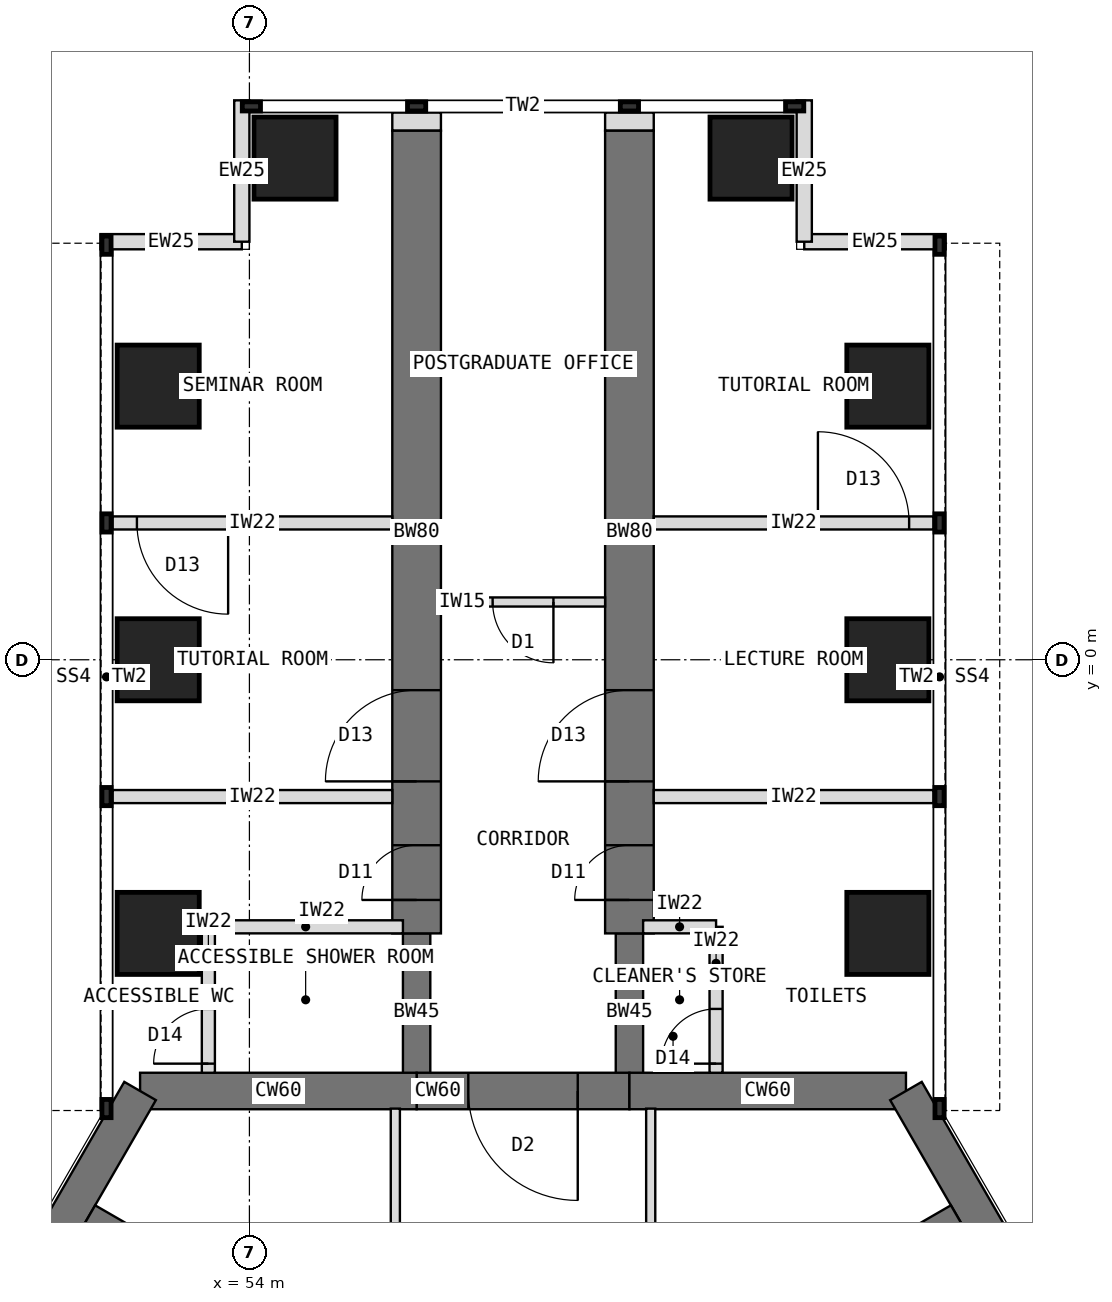
"""IFC4 building model, lengths in metres.
Left out: names, types, materials, properties, quantities, classifications, styles, units other than length and angle.
Written with IfcOpenShell. Run it as: python <this file> out.ifc"""

import sys

from ifc_helpers import new_model, si_unit, direction, frame, frame_2d, origin, origin_2d, place, context, subcontext, project, spatial, rectangle, extrude, element, fill, save


model = new_model("IFC4")
c1 = context("Model", 3, precision=1e-05, world=origin(), true_north=direction((0.0, 1.0)))
c2 = subcontext(c1, "Body", "Model", "MODEL_VIEW")
j1 = project(units=[si_unit("LENGTHUNIT", "METRE"), si_unit("PLANEANGLEUNIT", "RADIAN")], contexts=[c1])
p1 = place(None, origin())
s1 = spatial("IfcSite", under=j1, at=p1, CompositionType="ELEMENT")
p2 = place(p1, origin())
s2 = spatial("IfcBuilding", under=s1, at=p2, CompositionType="ELEMENT")
p3 = place(p2, frame((0.0, 0.0, 113.5)))
s3 = spatial("IfcBuildingStorey", under=s2, at=p3, CompositionType="ELEMENT", Elevation=113.5)
p4 = place(p3, frame((64.798, -7.092, 0.0), z_axis=(0.0, 0.0, 1.0), x_axis=(-1.0, 0.0, 0.0)))
e1 = element("IfcWall", 1, at=p4, inside=s3, PredefinedType="SHEAR", context=c2, shape_type="SweptSolid", body=[
    extrude(rectangle(XDim=4.548, YDim=0.6, at=frame_2d((2.274, 0.0))), origin(), (0.0, 0.0, 1.0), 4.0),
])
p5 = place(p3, frame((60.25, -7.092, 0.0), z_axis=(0.0, 0.0, 1.0), x_axis=(-1.0, 0.0, 0.0)))
e2 = element("IfcWall", 2, at=p5, inside=s3, PredefinedType="SHEAR", context=c2, shape_type="SweptSolid", body=[
    extrude(rectangle(XDim=3.5, YDim=0.6, at=frame_2d((1.75, 0.0))), origin(), (0.0, 0.0, 1.0), 4.0),
])
p6 = place(p5, frame((0.85, 0.0, 0.0)))
e3 = element("IfcOpeningElement", 3, at=p6, cuts=e2, PredefinedType="OPENING", context=c2, shape_type="SweptSolid", body=[
    extrude(rectangle(XDim=1.8, YDim=2.1, at=frame_2d((0.9, 1.05))), frame((0.0, 0.31, 0.0), z_axis=(0.0, -1.0, 0.0), x_axis=(1.0, 0.0, 0.0)), (0.0, 0.0, 1.0), 0.62),
])
p7 = place(p3, frame((56.75, -7.092, 0.0), z_axis=(0.0, 0.0, 1.0), x_axis=(-1.0, 0.0, 0.0)))
e4 = element("IfcWall", 4, at=p7, inside=s3, PredefinedType="SHEAR", context=c2, shape_type="SweptSolid", body=[
    extrude(rectangle(XDim=4.548, YDim=0.6, at=frame_2d((2.274, 0.0))), origin(), (0.0, 0.0, 1.0), 4.0),
])
for number, where, z_axis, x_axis in (
    (5, (52.202, -7.092, 0.0), (0.0, 0.0, 1.0), (-0.5, -0.866, 0.0)),
    (6, (71.096, -18.0, 0.0), (0.0, 0.0, 1.0), (-0.5, 0.866, 0.0)),
):
    element("IfcWall", number, at=place(p3, frame(where, z_axis=z_axis, x_axis=x_axis)), inside=s3, PredefinedType="SHEAR", context=c2, shape_type="SweptSolid", body=[
        extrude(rectangle(XDim=12.596, YDim=0.6, at=frame_2d((6.298, 0.0))), origin(), (0.0, 0.0, 1.0), 4.0),
    ])
p8 = place(p3, frame((56.75, -7.092, 0.0), z_axis=(0.0, 0.0, 1.0), x_axis=(0.0, 1.0, 0.0)))
e7 = element("IfcWall", 7, at=p8, inside=s3, PredefinedType="SHEAR", context=c2, shape_type="SweptSolid", body=[
    extrude(rectangle(XDim=2.592, YDim=0.45, at=frame_2d((1.296, 0.0))), origin(), (0.0, 0.0, 1.0), 4.0),
])
p9 = place(p3, frame((56.75, -4.5, 0.0), z_axis=(0.0, 0.0, 1.0), x_axis=(0.0, 1.0, 0.0)))
e8 = element("IfcWall", 8, at=p9, inside=s3, PredefinedType="SHEAR", context=c2, shape_type="SweptSolid", body=[
    extrude(rectangle(XDim=13.2, YDim=0.8, at=frame_2d((6.6, 0.0))), origin(), (0.0, 0.0, 1.0), 4.0),
])
p10 = place(p9, frame((0.55, 0.0, 0.0)))
e9 = element("IfcOpeningElement", 9, at=p10, cuts=e8, PredefinedType="OPENING", context=c2, shape_type="SweptSolid", body=[
    extrude(rectangle(XDim=0.9, YDim=2.1, at=frame_2d((0.45, 1.05))), frame((0.0, 0.41, 0.0), z_axis=(0.0, -1.0, 0.0), x_axis=(1.0, 0.0, 0.0)), (0.0, 0.0, 1.0), 0.82),
])
p11 = place(p9, frame((2.5, 0.0, 0.0)))
e10 = element("IfcOpeningElement", 10, at=p11, cuts=e8, PredefinedType="OPENING", context=c2, shape_type="SweptSolid", body=[
    extrude(rectangle(XDim=1.5, YDim=2.1, at=frame_2d((0.75, 1.05))), frame((0.0, 0.41, 0.0), z_axis=(0.0, -1.0, 0.0), x_axis=(1.0, 0.0, 0.0)), (0.0, 0.0, 1.0), 0.82),
])
p12 = place(p3, frame((60.25, -7.092, 0.0), z_axis=(0.0, 0.0, 1.0), x_axis=(0.0, 1.0, 0.0)))
e11 = element("IfcWall", 11, at=p12, inside=s3, PredefinedType="SHEAR", context=c2, shape_type="SweptSolid", body=[
    extrude(rectangle(XDim=2.592, YDim=0.45, at=frame_2d((1.296, 0.0))), origin(), (0.0, 0.0, 1.0), 4.0),
])
p13 = place(p3, frame((60.25, -4.5, 0.0), z_axis=(0.0, 0.0, 1.0), x_axis=(0.0, 1.0, 0.0)))
e12 = element("IfcWall", 12, at=p13, inside=s3, PredefinedType="SHEAR", context=c2, shape_type="SweptSolid", body=[
    extrude(rectangle(XDim=13.2, YDim=0.8, at=frame_2d((6.6, 0.0))), origin(), (0.0, 0.0, 1.0), 4.0),
])
p14 = place(p13, frame((0.55, 0.0, 0.0)))
e13 = element("IfcOpeningElement", 13, at=p14, cuts=e12, PredefinedType="OPENING", context=c2, shape_type="SweptSolid", body=[
    extrude(rectangle(XDim=0.9, YDim=2.1, at=frame_2d((0.45, 1.05))), frame((0.0, 0.41, 0.0), z_axis=(0.0, -1.0, 0.0), x_axis=(1.0, 0.0, 0.0)), (0.0, 0.0, 1.0), 0.82),
])
p15 = place(p13, frame((2.5, 0.0, 0.0)))
e14 = element("IfcOpeningElement", 14, at=p15, cuts=e12, PredefinedType="OPENING", context=c2, shape_type="SweptSolid", body=[
    extrude(rectangle(XDim=1.5, YDim=2.1, at=frame_2d((0.75, 1.05))), frame((0.0, 0.41, 0.0), z_axis=(0.0, -1.0, 0.0), x_axis=(1.0, 0.0, 0.0)), (0.0, 0.0, 1.0), 0.82),
])
for number, where, z_axis, x_axis in (
    (15, (52.5, -4.5, 0.0), (0.0, 0.0, 1.0), (1.0, 0.0, 0.0)),
    (16, (64.5, -4.5, 0.0), (0.0, 0.0, 1.0), (1.0, 0.0, 0.0)),
    (17, (52.5, 0.0, 0.0), (0.0, 0.0, 1.0), (1.0, 0.0, 0.0)),
    (18, (64.5, 0.0, 0.0), (0.0, 0.0, 1.0), (1.0, 0.0, 0.0)),
    (19, (52.5, 4.5, 0.0), (0.0, 0.0, 1.0), (1.0, 0.0, 0.0)),
    (20, (64.5, 4.5, 0.0), (0.0, 0.0, 1.0), (1.0, 0.0, 0.0)),
    (21, (54.75, 8.25, 0.0), (0.0, 0.0, 1.0), (1.0, 0.0, 0.0)),
    (22, (62.25, 8.25, 0.0), (0.0, 0.0, 1.0), (1.0, 0.0, 0.0)),
):
    element("IfcColumn", number, at=place(p3, frame(where, z_axis=z_axis, x_axis=x_axis)), inside=s3, PredefinedType="COLUMN", context=c2, shape_type="SweptSolid", body=[
        extrude(rectangle(XDim=1.35, YDim=1.35, at=origin_2d()), origin(), (0.0, 0.0, 1.0), 4.0),
    ])
for number, where, z_axis, x_axis in (
    (23, (51.55, 6.875, 0.0), (0.0, 0.0, 1.0), (1.0, 0.0, 0.0)),
    (24, (53.875, 6.875, 0.0), (0.0, 0.0, 1.0), (0.0, 1.0, 0.0)),
    (25, (65.45, 6.875, 0.0), (0.0, 0.0, 1.0), (-1.0, 0.0, 0.0)),
    (26, (63.125, 6.875, 0.0), (0.0, 0.0, 1.0), (0.0, 1.0, 0.0)),
):
    element("IfcWall", number, at=place(p3, frame(where, z_axis=z_axis, x_axis=x_axis)), inside=s3, PredefinedType="STANDARD", context=c2, shape_type="SweptSolid", body=[
        extrude(rectangle(XDim=2.325, YDim=0.25, at=frame_2d((1.163, 0.0))), origin(), (0.0, 0.0, 1.0), 3.8),
    ])
for number, where, z_axis, x_axis in (
    (27, (56.75, 8.7, 0.0), (0.0, 0.0, 1.0), (0.0, 1.0, 0.0)),
    (28, (60.25, 8.7, 0.0), (0.0, 0.0, 1.0), (0.0, 1.0, 0.0)),
):
    element("IfcWall", number, at=place(p3, frame(where, z_axis=z_axis, x_axis=x_axis)), inside=s3, PredefinedType="PARTITIONING", context=c2, shape_type="SweptSolid", body=[
        extrude(rectangle(XDim=0.3, YDim=0.8, at=frame_2d((0.15, 0.0))), origin(), (0.0, 0.0, 1.0), 3.8),
    ])
for number, where, z_axis, x_axis in (
    (29, (56.48, -12.099, 0.0), (0.0, 0.0, 1.0), (-0.866, 0.5, 0.0)),
    (30, (60.52, -12.099, 0.0), (0.0, 0.0, 1.0), (0.866, 0.5, 0.0)),
):
    element("IfcWall", number, at=place(p3, frame(where, z_axis=z_axis, x_axis=x_axis)), inside=s3, PredefinedType="SHEAR", context=c2, shape_type="SweptSolid", body=[
        extrude(rectangle(XDim=5.908, YDim=0.4, at=frame_2d((2.954, 0.0))), origin(), (0.0, 0.0, 1.0), 4.0),
    ])
p16 = place(p3, frame((56.35, -2.25, 0.0), z_axis=(0.0, 0.0, 1.0), x_axis=(-1.0, 0.0, 0.0)))
e31 = element("IfcWall", 31, at=p16, inside=s3, PredefinedType="PARTITIONING", context=c2, shape_type="SweptSolid", body=[
    extrude(rectangle(XDim=4.6, YDim=0.215, at=frame_2d((2.3, 0.0))), origin(), (0.0, 0.0, 1.0), 3.8),
])
p17 = place(p3, frame((56.35, 2.25, 0.0), z_axis=(0.0, 0.0, 1.0), x_axis=(-1.0, 0.0, 0.0)))
e32 = element("IfcWall", 32, at=p17, inside=s3, PredefinedType="PARTITIONING", context=c2, shape_type="SweptSolid", body=[
    extrude(rectangle(XDim=4.6, YDim=0.215, at=frame_2d((2.3, 0.0))), origin(), (0.0, 0.0, 1.0), 3.8),
])
p18 = place(p17, frame((2.7, 0.0, 0.0)))
e33 = element("IfcOpeningElement", 33, at=p18, cuts=e32, PredefinedType="OPENING", context=c2, shape_type="SweptSolid", body=[
    extrude(rectangle(XDim=1.5, YDim=2.1, at=frame_2d((0.75, 1.05))), frame((0.0, 0.117, 0.0), z_axis=(0.0, -1.0, 0.0), x_axis=(1.0, 0.0, 0.0)), (0.0, 0.0, 1.0), 0.235),
])
p19 = place(p3, frame((53.325, -6.792, 0.0), z_axis=(0.0, 0.0, 1.0), x_axis=(0.0, 1.0, 0.0)))
e34 = element("IfcWall", 34, at=p19, inside=s3, PredefinedType="PARTITIONING", context=c2, shape_type="SweptSolid", body=[
    extrude(rectangle(XDim=2.4, YDim=0.215, at=frame_2d((1.2, 0.0))), origin(), (0.0, 0.0, 1.0), 3.8),
])
p20 = place(p19, frame((0.15, 0.0, 0.0)))
e35 = element("IfcOpeningElement", 35, at=p20, cuts=e34, PredefinedType="OPENING", context=c2, shape_type="SweptSolid", body=[
    extrude(rectangle(XDim=0.9, YDim=2.1, at=frame_2d((0.45, 1.05))), frame((0.0, 0.117, 0.0), z_axis=(0.0, -1.0, 0.0), x_axis=(1.0, 0.0, 0.0)), (0.0, 0.0, 1.0), 0.235),
])
p21 = place(p3, frame((56.525, -4.392, 0.0), z_axis=(0.0, 0.0, 1.0), x_axis=(-1.0, 0.0, 0.0)))
e36 = element("IfcWall", 36, at=p21, inside=s3, PredefinedType="PARTITIONING", context=c2, shape_type="SweptSolid", body=[
    extrude(rectangle(XDim=3.2, YDim=0.215, at=frame_2d((1.6, 0.0))), origin(), (0.0, 0.0, 1.0), 3.8),
])
p22 = place(p3, frame((60.65, -2.25, 0.0), z_axis=(0.0, 0.0, 1.0), x_axis=(1.0, 0.0, 0.0)))
e37 = element("IfcWall", 37, at=p22, inside=s3, PredefinedType="PARTITIONING", context=c2, shape_type="SweptSolid", body=[
    extrude(rectangle(XDim=4.6, YDim=0.215, at=frame_2d((2.3, 0.0))), origin(), (0.0, 0.0, 1.0), 3.8),
])
p23 = place(p3, frame((60.65, 2.25, 0.0), z_axis=(0.0, 0.0, 1.0), x_axis=(1.0, 0.0, 0.0)))
e38 = element("IfcWall", 38, at=p23, inside=s3, PredefinedType="PARTITIONING", context=c2, shape_type="SweptSolid", body=[
    extrude(rectangle(XDim=4.6, YDim=0.215, at=frame_2d((2.3, 0.0))), origin(), (0.0, 0.0, 1.0), 3.8),
])
p24 = place(p23, frame((2.7, 0.0, 0.0)))
e39 = element("IfcOpeningElement", 39, at=p24, cuts=e38, PredefinedType="OPENING", context=c2, shape_type="SweptSolid", body=[
    extrude(rectangle(XDim=1.5, YDim=2.1, at=frame_2d((0.75, 1.05))), frame((0.0, 0.117, 0.0), z_axis=(0.0, -1.0, 0.0), x_axis=(1.0, 0.0, 0.0)), (0.0, 0.0, 1.0), 0.235),
])
p25 = place(p3, frame((61.675, -6.792, 0.0), z_axis=(0.0, 0.0, 1.0), x_axis=(0.0, 1.0, 0.0)))
e40 = element("IfcWall", 40, at=p25, inside=s3, PredefinedType="PARTITIONING", context=c2, shape_type="SweptSolid", body=[
    extrude(rectangle(XDim=2.4, YDim=0.215, at=frame_2d((1.2, 0.0))), origin(), (0.0, 0.0, 1.0), 3.8),
])
p26 = place(p25, frame((0.15, 0.0, 0.0)))
e41 = element("IfcOpeningElement", 41, at=p26, cuts=e40, PredefinedType="OPENING", context=c2, shape_type="SweptSolid", body=[
    extrude(rectangle(XDim=0.9, YDim=2.1, at=frame_2d((0.45, 1.05))), frame((0.0, 0.117, 0.0), z_axis=(0.0, -1.0, 0.0), x_axis=(1.0, 0.0, 0.0)), (0.0, 0.0, 1.0), 0.235),
])
p27 = place(p3, frame((60.475, -4.392, 0.0), z_axis=(0.0, 0.0, 1.0), x_axis=(1.0, 0.0, 0.0)))
e42 = element("IfcWall", 42, at=p27, inside=s3, PredefinedType="PARTITIONING", context=c2, shape_type="SweptSolid", body=[
    extrude(rectangle(XDim=1.2, YDim=0.215, at=frame_2d((0.6, 0.0))), origin(), (0.0, 0.0, 1.0), 3.8),
])
p28 = place(p3, frame((56.4, -11.857, 0.0), z_axis=(0.0, 0.0, 1.0), x_axis=(0.0, 1.0, 0.0)))
e43 = element("IfcWall", 43, at=p28, inside=s3, PredefinedType="PARTITIONING", context=c2, shape_type="SweptSolid", body=[
    extrude(rectangle(XDim=4.476, YDim=0.15, at=frame_2d((2.238, 0.0))), origin(), (0.0, 0.0, 1.0), 3.8),
])
p29 = place(p28, frame((0.843, 0.0, 0.0)))
e44 = element("IfcOpeningElement", 44, at=p29, cuts=e43, PredefinedType="OPENING", context=c2, shape_type="SweptSolid", body=[
    extrude(rectangle(XDim=1.0, YDim=2.1, at=frame_2d((0.5, 1.05))), frame((0.0, 0.085, 0.0), z_axis=(0.0, -1.0, 0.0), x_axis=(1.0, 0.0, 0.0)), (0.0, 0.0, 1.0), 0.17),
])
p30 = place(p3, frame((60.6, -7.382, 0.0), z_axis=(0.0, 0.0, 1.0), x_axis=(0.0, -1.0, 0.0)))
e45 = element("IfcWall", 45, at=p30, inside=s3, PredefinedType="PARTITIONING", context=c2, shape_type="SweptSolid", body=[
    extrude(rectangle(XDim=4.476, YDim=0.15, at=frame_2d((2.238, 0.0))), origin(), (0.0, 0.0, 1.0), 3.8),
])
p31 = place(p30, frame((2.633, 0.0, 0.0)))
e46 = element("IfcOpeningElement", 46, at=p31, cuts=e45, PredefinedType="OPENING", context=c2, shape_type="SweptSolid", body=[
    extrude(rectangle(XDim=1.0, YDim=2.1, at=frame_2d((0.5, 1.05))), frame((0.0, 0.085, 0.0), z_axis=(0.0, -1.0, 0.0), x_axis=(1.0, 0.0, 0.0)), (0.0, 0.0, 1.0), 0.17),
])
p32 = place(p3, frame((59.85, 0.95, 0.0), z_axis=(0.0, 0.0, 1.0), x_axis=(-1.0, 0.0, 0.0)))
e47 = element("IfcWall", 47, at=p32, inside=s3, PredefinedType="PARTITIONING", context=c2, shape_type="SweptSolid", body=[
    extrude(rectangle(XDim=2.7, YDim=0.15, at=frame_2d((1.35, 0.0))), origin(), (0.0, 0.0, 1.0), 3.8),
])
p33 = place(p32, frame((0.85, 0.0, 0.0)))
e48 = element("IfcOpeningElement", 48, at=p33, cuts=e47, PredefinedType="OPENING", context=c2, shape_type="SweptSolid", body=[
    extrude(rectangle(XDim=1.0, YDim=2.1, at=frame_2d((0.5, 1.05))), frame((0.0, 0.085, 0.0), z_axis=(0.0, -1.0, 0.0), x_axis=(1.0, 0.0, 0.0)), (0.0, 0.0, 1.0), 0.17),
])
p34 = place(p6, origin())
e49 = element("IfcDoor", 49, at=p34, inside=s3, OperationType="DOUBLE_DOOR_DOUBLE_SWING", PredefinedType="DOOR", context=c2, shape_type="SweptSolid", body=[
    extrude(rectangle(XDim=1.72, YDim=2.06, at=frame_2d((0.9, 1.03))), frame((0.0, 0.025, 0.0), z_axis=(0.0, -1.0, 0.0), x_axis=(1.0, 0.0, 0.0)), (0.0, 0.0, 1.0), 0.05),
    extrude(rectangle(XDim=0.04, YDim=2.1, at=frame_2d((0.02, 1.05))), frame((0.0, 0.3, 0.0), z_axis=(0.0, -1.0, 0.0), x_axis=(1.0, 0.0, 0.0)), (0.0, 0.0, 1.0), 0.6),
    extrude(rectangle(XDim=0.04, YDim=2.1, at=frame_2d((1.78, 1.05))), frame((0.0, 0.3, 0.0), z_axis=(0.0, -1.0, 0.0), x_axis=(1.0, 0.0, 0.0)), (0.0, 0.0, 1.0), 0.6),
    extrude(rectangle(XDim=1.72, YDim=0.04, at=frame_2d((0.9, 2.08))), frame((0.0, 0.3, 0.0), z_axis=(0.0, -1.0, 0.0), x_axis=(1.0, 0.0, 0.0)), (0.0, 0.0, 1.0), 0.6),
])
fill(e3, e49)
p35 = place(p18, origin())
e50 = element("IfcDoor", 50, at=p35, inside=s3, OperationType="DOUBLE_DOOR_SINGLE_SWING", PredefinedType="DOOR", context=c2, shape_type="SweptSolid", body=[
    extrude(rectangle(XDim=1.5, YDim=2.1, at=frame_2d((0.75, 1.05))), frame((0.0, 0.025, 0.0), z_axis=(0.0, -1.0, 0.0), x_axis=(1.0, 0.0, 0.0)), (0.0, 0.0, 1.0), 0.05),
])
fill(e33, e50)
p36 = place(p20, origin())
e51 = element("IfcDoor", 51, at=p36, inside=s3, OperationType="SINGLE_SWING_LEFT", PredefinedType="DOOR", context=c2, shape_type="SweptSolid", body=[
    extrude(rectangle(XDim=0.9, YDim=2.1, at=frame_2d((0.45, 1.05))), frame((0.0, 0.025, 0.0), z_axis=(0.0, -1.0, 0.0), x_axis=(1.0, 0.0, 0.0)), (0.0, 0.0, 1.0), 0.05),
])
fill(e35, e51)
p37 = place(p24, origin())
e52 = element("IfcDoor", 52, at=p37, inside=s3, OperationType="DOUBLE_DOOR_SINGLE_SWING", PredefinedType="DOOR", context=c2, shape_type="SweptSolid", body=[
    extrude(rectangle(XDim=1.5, YDim=2.1, at=frame_2d((0.75, 1.05))), frame((0.0, 0.025, 0.0), z_axis=(0.0, -1.0, 0.0), x_axis=(1.0, 0.0, 0.0)), (0.0, 0.0, 1.0), 0.05),
])
fill(e39, e52)
p38 = place(p26, origin())
e53 = element("IfcDoor", 53, at=p38, inside=s3, OperationType="SINGLE_SWING_LEFT", PredefinedType="DOOR", context=c2, shape_type="SweptSolid", body=[
    extrude(rectangle(XDim=0.9, YDim=2.1, at=frame_2d((0.45, 1.05))), frame((0.0, 0.025, 0.0), z_axis=(0.0, -1.0, 0.0), x_axis=(1.0, 0.0, 0.0)), (0.0, 0.0, 1.0), 0.05),
])
fill(e41, e53)
p39 = place(p33, origin())
e54 = element("IfcDoor", 54, at=p39, inside=s3, OperationType="SINGLE_SWING_LEFT", PredefinedType="DOOR", context=c2, shape_type="SweptSolid", body=[
    extrude(rectangle(XDim=1.0, YDim=2.1, at=frame_2d((0.5, 1.05))), frame((0.0, 0.025, 0.0), z_axis=(0.0, -1.0, 0.0), x_axis=(1.0, 0.0, 0.0)), (0.0, 0.0, 1.0), 0.05),
])
fill(e48, e54)
p40 = place(p10, origin())
e55 = element("IfcDoor", 55, at=p40, inside=s3, OperationType="SINGLE_SWING_LEFT", PredefinedType="DOOR", context=c2, shape_type="SweptSolid", body=[
    extrude(rectangle(XDim=0.82, YDim=2.06, at=frame_2d((0.45, 1.03))), frame((0.0, 0.025, 0.0), z_axis=(0.0, -1.0, 0.0), x_axis=(1.0, 0.0, 0.0)), (0.0, 0.0, 1.0), 0.05),
    extrude(rectangle(XDim=0.04, YDim=2.1, at=frame_2d((0.02, 1.05))), frame((0.0, 0.4, 0.0), z_axis=(0.0, -1.0, 0.0), x_axis=(1.0, 0.0, 0.0)), (0.0, 0.0, 1.0), 0.8),
    extrude(rectangle(XDim=0.04, YDim=2.1, at=frame_2d((0.88, 1.05))), frame((0.0, 0.4, 0.0), z_axis=(0.0, -1.0, 0.0), x_axis=(1.0, 0.0, 0.0)), (0.0, 0.0, 1.0), 0.8),
    extrude(rectangle(XDim=0.82, YDim=0.04, at=frame_2d((0.45, 2.08))), frame((0.0, 0.4, 0.0), z_axis=(0.0, -1.0, 0.0), x_axis=(1.0, 0.0, 0.0)), (0.0, 0.0, 1.0), 0.8),
])
fill(e9, e55)
p41 = place(p11, origin())
e56 = element("IfcDoor", 56, at=p41, inside=s3, OperationType="DOUBLE_DOOR_SINGLE_SWING", PredefinedType="DOOR", context=c2, shape_type="SweptSolid", body=[
    extrude(rectangle(XDim=1.42, YDim=2.06, at=frame_2d((0.75, 1.03))), frame((0.0, 0.025, 0.0), z_axis=(0.0, -1.0, 0.0), x_axis=(1.0, 0.0, 0.0)), (0.0, 0.0, 1.0), 0.05),
    extrude(rectangle(XDim=0.04, YDim=2.1, at=frame_2d((0.02, 1.05))), frame((0.0, 0.4, 0.0), z_axis=(0.0, -1.0, 0.0), x_axis=(1.0, 0.0, 0.0)), (0.0, 0.0, 1.0), 0.8),
    extrude(rectangle(XDim=0.04, YDim=2.1, at=frame_2d((1.48, 1.05))), frame((0.0, 0.4, 0.0), z_axis=(0.0, -1.0, 0.0), x_axis=(1.0, 0.0, 0.0)), (0.0, 0.0, 1.0), 0.8),
    extrude(rectangle(XDim=1.42, YDim=0.04, at=frame_2d((0.75, 2.08))), frame((0.0, 0.4, 0.0), z_axis=(0.0, -1.0, 0.0), x_axis=(1.0, 0.0, 0.0)), (0.0, 0.0, 1.0), 0.8),
])
fill(e10, e56)
p42 = place(p14, origin())
e57 = element("IfcDoor", 57, at=p42, inside=s3, OperationType="SINGLE_SWING_LEFT", PredefinedType="DOOR", context=c2, shape_type="SweptSolid", body=[
    extrude(rectangle(XDim=0.82, YDim=2.06, at=frame_2d((0.45, 1.03))), frame((0.0, 0.025, 0.0), z_axis=(0.0, -1.0, 0.0), x_axis=(1.0, 0.0, 0.0)), (0.0, 0.0, 1.0), 0.05),
    extrude(rectangle(XDim=0.04, YDim=2.1, at=frame_2d((0.02, 1.05))), frame((0.0, 0.4, 0.0), z_axis=(0.0, -1.0, 0.0), x_axis=(1.0, 0.0, 0.0)), (0.0, 0.0, 1.0), 0.8),
    extrude(rectangle(XDim=0.04, YDim=2.1, at=frame_2d((0.88, 1.05))), frame((0.0, 0.4, 0.0), z_axis=(0.0, -1.0, 0.0), x_axis=(1.0, 0.0, 0.0)), (0.0, 0.0, 1.0), 0.8),
    extrude(rectangle(XDim=0.82, YDim=0.04, at=frame_2d((0.45, 2.08))), frame((0.0, 0.4, 0.0), z_axis=(0.0, -1.0, 0.0), x_axis=(1.0, 0.0, 0.0)), (0.0, 0.0, 1.0), 0.8),
])
fill(e13, e57)
p43 = place(p15, origin())
e58 = element("IfcDoor", 58, at=p43, inside=s3, OperationType="DOUBLE_DOOR_SINGLE_SWING", PredefinedType="DOOR", context=c2, shape_type="SweptSolid", body=[
    extrude(rectangle(XDim=1.42, YDim=2.06, at=frame_2d((0.75, 1.03))), frame((0.0, 0.025, 0.0), z_axis=(0.0, -1.0, 0.0), x_axis=(1.0, 0.0, 0.0)), (0.0, 0.0, 1.0), 0.05),
    extrude(rectangle(XDim=0.04, YDim=2.1, at=frame_2d((0.02, 1.05))), frame((0.0, 0.4, 0.0), z_axis=(0.0, -1.0, 0.0), x_axis=(1.0, 0.0, 0.0)), (0.0, 0.0, 1.0), 0.8),
    extrude(rectangle(XDim=0.04, YDim=2.1, at=frame_2d((1.48, 1.05))), frame((0.0, 0.4, 0.0), z_axis=(0.0, -1.0, 0.0), x_axis=(1.0, 0.0, 0.0)), (0.0, 0.0, 1.0), 0.8),
    extrude(rectangle(XDim=1.42, YDim=0.04, at=frame_2d((0.75, 2.08))), frame((0.0, 0.4, 0.0), z_axis=(0.0, -1.0, 0.0), x_axis=(1.0, 0.0, 0.0)), (0.0, 0.0, 1.0), 0.8),
])
fill(e14, e58)
save(model, sys.argv[1])
